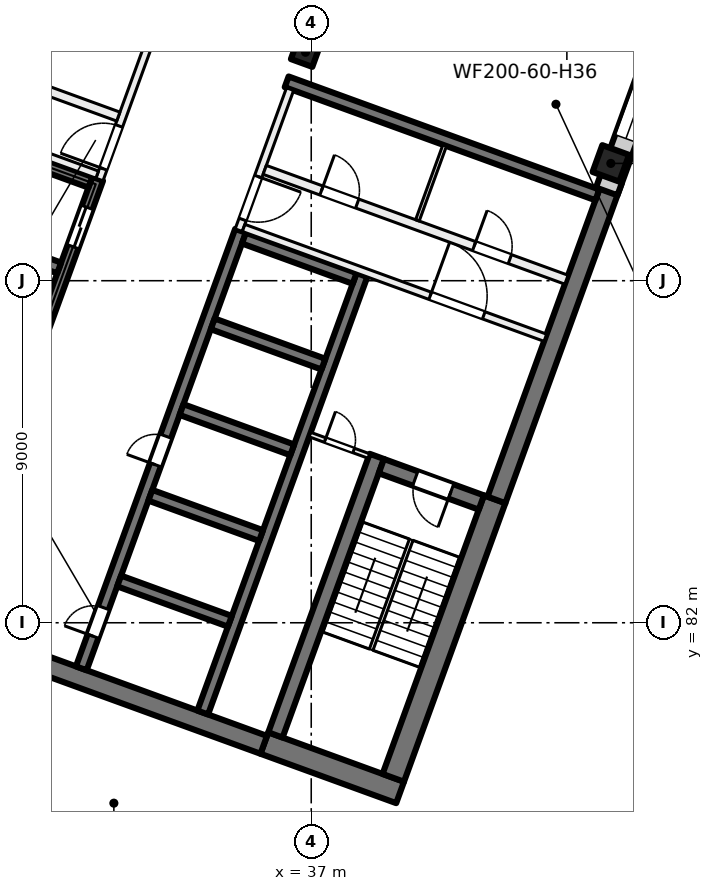
"""IFC4 building model, lengths in metres.
Left out: names, types, materials, properties, quantities, classifications, styles, units other than length and angle.
Written with IfcOpenShell. Run it as: python <this file> out.ifc"""

import sys

from ifc_helpers import new_model, si_unit, direction, frame, frame_2d, origin, origin_2d, place, context, subcontext, project, spatial, rectangle, extrude, element, fill, save


model = new_model("IFC4")
c1 = context("Model", 3, precision=1e-05, world=origin(), true_north=direction((0.0, 1.0)))
c2 = subcontext(c1, "Body", "Model", "MODEL_VIEW")
j1 = project(units=[si_unit("LENGTHUNIT", "METRE"), si_unit("PLANEANGLEUNIT", "RADIAN")], contexts=[c1])
p1 = place(None, origin())
s1 = spatial("IfcSite", under=j1, at=p1, CompositionType="ELEMENT")
p2 = place(p1, origin())
s2 = spatial("IfcBuilding", under=s1, at=p2, CompositionType="ELEMENT")
p3 = place(p2, frame((0.0, 0.0, 212.0)))
s3 = spatial("IfcBuildingStorey", under=s2, at=p3, CompositionType="ELEMENT", Elevation=212.0)
p4 = place(p3, frame((36.849, 97.011, 0.0), z_axis=(0.0, 0.0, 1.0), x_axis=(-0.342020143326, -0.939692620786, 0.0)))
e1 = element("IfcColumn", 1, at=p4, inside=s3, PredefinedType="COLUMN", context=c2, shape_type="SweptSolid", body=[
    extrude(rectangle(XDim=0.6, YDim=0.6, at=origin_2d()), origin(), (0.0, 0.0, 1.0), 4.0),
])
p5 = place(p3, frame((44.884, 94.087, 0.0), z_axis=(0.0, 0.0, 1.0), x_axis=(-0.342020143326, -0.939692620786, 0.0)))
e2 = element("IfcColumn", 2, at=p5, inside=s3, PredefinedType="COLUMN", context=c2, shape_type="SweptSolid", body=[
    extrude(rectangle(XDim=0.75, YDim=0.75, at=origin_2d()), origin(), (0.0, 0.0, 1.0), 4.0),
])
p6 = place(p3, frame((39.338, 77.535, 0.0), z_axis=(0.0, 0.0, 1.0), x_axis=(-0.939701471648, 0.341995824804, 0.0)))
e3 = element("IfcWall", 3, at=p6, inside=s3, PredefinedType="SHEAR", context=c2, shape_type="SweptSolid", body=[
    extrude(rectangle(XDim=3.8, YDim=0.6, at=frame_2d((1.9, 0.0))), origin(), (0.0, 0.0, 1.0), 4.0),
])
p7 = place(p3, frame((35.75, 78.788, 0.0), z_axis=(0.0, 0.0, 1.0), x_axis=(-0.939692894512, 0.342019391267, 0.0)))
e4 = element("IfcWall", 4, at=p7, inside=s3, PredefinedType="SHEAR", context=c2, shape_type="SweptSolid", body=[
    extrude(rectangle(XDim=14.4, YDim=0.5, at=frame_2d((7.2, 0.0))), origin(), (0.0, 0.0, 1.0), 4.0),
])
p8 = place(p3, frame((39.159, 77.92, 0.0), z_axis=(0.0, 0.0, 1.0), x_axis=(0.342016982193, 0.939693771338, 0.0)))
e5 = element("IfcWall", 5, at=p8, inside=s3, PredefinedType="SHEAR", context=c2, shape_type="SweptSolid", body=[
    extrude(rectangle(XDim=7.8, YDim=0.6, at=frame_2d((3.9, 0.0))), origin(), (0.0, 0.0, 1.0), 4.0),
])
p9 = place(p3, frame((41.874, 85.232, 0.0), z_axis=(0.0, 0.0, 1.0), x_axis=(0.342020437038, 0.939692513883, 0.0)))
e6 = element("IfcWall", 6, at=p9, inside=s3, PredefinedType="SHEAR", context=c2, shape_type="SweptSolid", body=[
    extrude(rectangle(XDim=8.975, YDim=0.5, at=frame_2d((4.487, 0.0))), origin(), (0.0, 0.0, 1.0), 4.0),
])
p10 = place(p3, frame((36.058, 79.048, 0.0), z_axis=(0.0, 0.0, 1.0), x_axis=(0.342016982193, 0.939693771338, 0.0)))
e7 = element("IfcWall", 7, at=p10, inside=s3, PredefinedType="SHEAR", context=c2, shape_type="SweptSolid", body=[
    extrude(rectangle(XDim=7.8, YDim=0.4, at=frame_2d((3.9, 0.0))), origin(), (0.0, 0.0, 1.0), 4.0),
])
p11 = place(p3, frame((41.476, 85.164, 0.0), z_axis=(0.0, 0.0, 1.0), x_axis=(-0.939678810556, 0.342058084236, 0.0)))
e8 = element("IfcWall", 8, at=p11, inside=s3, PredefinedType="SHEAR", context=c2, shape_type="SweptSolid", body=[
    extrude(rectangle(XDim=2.8, YDim=0.4, at=frame_2d((1.4, 0.0))), origin(), (0.0, 0.0, 1.0), 4.0),
])
p12 = place(p11, frame((0.85, 0.0, 0.0)))
e9 = element("IfcOpeningElement", 9, at=p12, cuts=e8, PredefinedType="OPENING", context=c2, shape_type="SweptSolid", body=[
    extrude(rectangle(XDim=1.0, YDim=2.1, at=frame_2d((0.5, 1.05))), frame((0.0, 0.21, 0.0), z_axis=(0.0, -1.0, 0.0), x_axis=(1.0, 0.0, 0.0)), (0.0, 0.0, 1.0), 0.42),
])
p13 = place(p3, frame((30.949, 80.801, 0.0), z_axis=(0.0, 0.0, 1.0), x_axis=(0.342016684409, 0.939693879721, 0.0)))
e10 = element("IfcWall", 10, at=p13, inside=s3, PredefinedType="SHEAR", context=c2, shape_type="SweptSolid", body=[
    extrude(rectangle(XDim=12.25, YDim=0.3, at=frame_2d((6.125, 0.0))), origin(), (0.0, 0.0, 1.0), 4.0),
])
p14 = place(p13, frame((0.9, 0.0, 0.0)))
e11 = element("IfcOpeningElement", 11, at=p14, cuts=e10, PredefinedType="OPENING", context=c2, shape_type="SweptSolid", body=[
    extrude(rectangle(XDim=0.8, YDim=2.1, at=frame_2d((0.4, 1.05))), frame((0.0, 0.16, 0.0), z_axis=(0.0, -1.0, 0.0), x_axis=(1.0, 0.0, 0.0)), (0.0, 0.0, 1.0), 0.32),
])
p15 = place(p13, frame((5.7, 0.0, 0.0)))
e12 = element("IfcOpeningElement", 12, at=p15, cuts=e10, PredefinedType="OPENING", context=c2, shape_type="SweptSolid", body=[
    extrude(rectangle(XDim=0.8, YDim=2.1, at=frame_2d((0.4, 1.05))), frame((0.0, 0.16, 0.0), z_axis=(0.0, -1.0, 0.0), x_axis=(1.0, 0.0, 0.0)), (0.0, 0.0, 1.0), 0.32),
])
p16 = place(p3, frame((34.144, 79.638, 0.0), z_axis=(0.0, 0.0, 1.0), x_axis=(0.342016684409, 0.939693879721, 0.0)))
e13 = element("IfcWall", 13, at=p16, inside=s3, PredefinedType="SHEAR", context=c2, shape_type="SweptSolid", body=[
    extrude(rectangle(XDim=12.25, YDim=0.3, at=frame_2d((6.125, 0.0))), origin(), (0.0, 0.0, 1.0), 4.0),
])
p17 = place(p3, frame((34.858, 82.039, 0.0), z_axis=(0.0, 0.0, 1.0), x_axis=(-0.939689908313, 0.342027595692, 0.0)))
e14 = element("IfcWall", 14, at=p17, inside=s3, PredefinedType="SHEAR", context=c2, shape_type="SweptSolid", body=[
    extrude(rectangle(XDim=3.1, YDim=0.3, at=frame_2d((1.55, 0.0))), origin(), (0.0, 0.0, 1.0), 4.0),
])
p18 = place(p3, frame((35.679, 84.294, 0.0), z_axis=(0.0, 0.0, 1.0), x_axis=(-0.939706007505, 0.341983361377, 0.0)))
e15 = element("IfcWall", 15, at=p18, inside=s3, PredefinedType="SHEAR", context=c2, shape_type="SweptSolid", body=[
    extrude(rectangle(XDim=3.1, YDim=0.3, at=frame_2d((1.55, 0.0))), origin(), (0.0, 0.0, 1.0), 4.0),
])
for number, where, z_axis, x_axis in (
    (16, (36.5, 86.549, 0.0), (0.0, 0.0, 1.0), (-0.94, 0.342, 0.0)),
    (17, (37.321, 88.805, 0.0), (0.0, 0.0, 1.0), (-0.94, 0.342, 0.0)),
    (18, (38.142, 91.06, 0.0), (0.0, 0.0, 1.0), (-0.94, 0.342, 0.0)),
):
    element("IfcWall", number, at=place(p3, frame(where, z_axis=z_axis, x_axis=x_axis)), inside=s3, PredefinedType="SHEAR", context=c2, shape_type="SweptSolid", body=[
        extrude(rectangle(XDim=3.1, YDim=0.3, at=frame_2d((1.55, 0.0))), origin(), (0.0, 0.0, 1.0), 4.0),
    ])
p19 = place(p3, frame((27.191, 82.169, 0.0), z_axis=(0.0, 0.0, 1.0), x_axis=(0.342016684409, 0.939693879721, 0.0)))
e19 = element("IfcWall", 19, at=p19, inside=s3, PredefinedType="SHEAR", context=c2, shape_type="SweptSolid", body=[
    extrude(rectangle(XDim=12.25, YDim=0.3, at=frame_2d((6.125, 0.0))), origin(), (0.0, 0.0, 1.0), 4.0),
])
p20 = place(p19, frame((0.75, 0.0, 0.0)))
e20 = element("IfcOpeningElement", 20, at=p20, cuts=e19, PredefinedType="OPENING", context=c2, shape_type="SweptSolid", body=[
    extrude(rectangle(XDim=1.1, YDim=2.1, at=frame_2d((0.55, 1.05))), frame((0.0, 0.16, 0.0), z_axis=(0.0, -1.0, 0.0), x_axis=(1.0, 0.0, 0.0)), (0.0, 0.0, 1.0), 0.32),
])
p21 = place(p19, frame((3.15, 0.0, 0.0)))
e21 = element("IfcOpeningElement", 21, at=p21, cuts=e19, PredefinedType="OPENING", context=c2, shape_type="SweptSolid", body=[
    extrude(rectangle(XDim=1.1, YDim=2.1, at=frame_2d((0.55, 1.05))), frame((0.0, 0.16, 0.0), z_axis=(0.0, -1.0, 0.0), x_axis=(1.0, 0.0, 0.0)), (0.0, 0.0, 1.0), 0.32),
])
p22 = place(p19, frame((5.55, 0.0, 0.0)))
e22 = element("IfcOpeningElement", 22, at=p22, cuts=e19, PredefinedType="OPENING", context=c2, shape_type="SweptSolid", body=[
    extrude(rectangle(XDim=1.1, YDim=2.1, at=frame_2d((0.55, 1.05))), frame((0.0, 0.16, 0.0), z_axis=(0.0, -1.0, 0.0), x_axis=(1.0, 0.0, 0.0)), (0.0, 0.0, 1.0), 0.32),
])
p23 = place(p19, frame((10.35, 0.0, 0.0)))
e23 = element("IfcOpeningElement", 23, at=p23, cuts=e19, PredefinedType="OPENING", context=c2, shape_type="SweptSolid", body=[
    extrude(rectangle(XDim=1.1, YDim=2.1, at=frame_2d((0.55, 1.05))), frame((0.0, 0.16, 0.0), z_axis=(0.0, -1.0, 0.0), x_axis=(1.0, 0.0, 0.0)), (0.0, 0.0, 1.0), 0.32),
])
for number, where, z_axis, x_axis in (
    (24, (30.367, 91.336, 0.0), (0.0, 0.0, 1.0), (-0.94, 0.342, 0.0)),
    (25, (31.188, 93.591, 0.0), (0.0, 0.0, 1.0), (-0.94, 0.342, 0.0)),
):
    element("IfcWall", number, at=place(p3, frame(where, z_axis=z_axis, x_axis=x_axis)), inside=s3, PredefinedType="SHEAR", context=c2, shape_type="SweptSolid", body=[
        extrude(rectangle(XDim=3.1, YDim=0.3, at=frame_2d((1.55, 0.0))), origin(), (0.0, 0.0, 1.0), 4.0),
    ])
p24 = place(p3, frame((44.529, 93.258, 0.0), z_axis=(0.0, 0.0, 1.0), x_axis=(-0.9396917844, 0.342022441267, 0.0)))
e26 = element("IfcWall", 26, at=p24, inside=s3, PredefinedType="SHEAR", context=c2, shape_type="SweptSolid", body=[
    extrude(rectangle(XDim=8.7, YDim=0.3, at=frame_2d((4.35, 0.0))), origin(), (0.0, 0.0, 1.0), 4.0),
])
p25 = place(p3, frame((51.877, 112.862, 0.0), z_axis=(0.0, 0.0, 1.0), x_axis=(-0.342020589714, -0.939692458314, 0.0)))
e27 = element("IfcWall", 27, at=p25, inside=s3, PredefinedType="SOLIDWALL", context=c2, shape_type="SweptSolid", body=[
    extrude(rectangle(XDim=20.765, YDim=0.6, at=frame_2d((10.382, 0.0))), origin(), (0.0, 0.0, 1.0), 3.625),
])
p26 = place(p25, frame((2.785, 0.0, 0.9)))
e28 = element("IfcOpeningElement", 28, at=p26, cuts=e27, PredefinedType="OPENING", context=c2, shape_type="SweptSolid", body=[
    extrude(rectangle(XDim=3.0, YDim=2.4, at=frame_2d((1.5, 1.2))), frame((0.0, 0.31, 0.0), z_axis=(0.0, -1.0, 0.0), x_axis=(1.0, 0.0, 0.0)), (0.0, 0.0, 1.0), 0.62),
])
p27 = place(p25, frame((7.285, 0.0, 0.9)))
e29 = element("IfcOpeningElement", 29, at=p27, cuts=e27, PredefinedType="OPENING", context=c2, shape_type="SweptSolid", body=[
    extrude(rectangle(XDim=3.0, YDim=2.4, at=frame_2d((1.5, 1.2))), frame((0.0, 0.31, 0.0), z_axis=(0.0, -1.0, 0.0), x_axis=(1.0, 0.0, 0.0)), (0.0, 0.0, 1.0), 0.62),
])
p28 = place(p25, frame((11.785, 0.0, 0.9)))
e30 = element("IfcOpeningElement", 30, at=p28, cuts=e27, PredefinedType="OPENING", context=c2, shape_type="SweptSolid", body=[
    extrude(rectangle(XDim=3.0, YDim=2.4, at=frame_2d((1.5, 1.2))), frame((0.0, 0.31, 0.0), z_axis=(0.0, -1.0, 0.0), x_axis=(1.0, 0.0, 0.0)), (0.0, 0.0, 1.0), 0.62),
])
p29 = place(p25, frame((16.285, 0.0, 0.9)))
e31 = element("IfcOpeningElement", 31, at=p29, cuts=e27, PredefinedType="OPENING", context=c2, shape_type="SweptSolid", body=[
    extrude(rectangle(XDim=3.0, YDim=2.4, at=frame_2d((1.5, 1.2))), frame((0.0, 0.31, 0.0), z_axis=(0.0, -1.0, 0.0), x_axis=(1.0, 0.0, 0.0)), (0.0, 0.0, 1.0), 0.62),
])
p30 = place(p3, frame((31.427, 93.663, 0.0), z_axis=(0.0, 0.0, 1.0), x_axis=(0.342030870568, 0.93968871632, 0.0)))
e32 = element("IfcWall", 32, at=p30, inside=s3, PredefinedType="PARTITIONING", context=c2, shape_type="SweptSolid", body=[
    extrude(rectangle(XDim=3.95, YDim=0.2, at=frame_2d((1.975, 0.0))), origin(), (0.0, 0.0, 1.0), 3.625),
])
p31 = place(p30, frame((0.3, 0.0, 0.0)))
e33 = element("IfcOpeningElement", 33, at=p31, cuts=e32, PredefinedType="OPENING", context=c2, shape_type="SweptSolid", body=[
    extrude(rectangle(XDim=1.2, YDim=2.1, at=frame_2d((0.6, 1.05))), frame((0.0, 0.11, 0.0), z_axis=(0.0, -1.0, 0.0), x_axis=(1.0, 0.0, 0.0)), (0.0, 0.0, 1.0), 0.22),
])
p32 = place(p3, frame((23.427, 96.682, 0.0), z_axis=(0.0, 0.0, 1.0), x_axis=(0.939690465531, -0.342026064782, 0.0)))
e34 = element("IfcWall", 34, at=p32, inside=s3, PredefinedType="PARTITIONING", context=c2, shape_type="SweptSolid", body=[
    extrude(rectangle(XDim=8.45, YDim=0.2, at=frame_2d((4.225, 0.0))), origin(), (0.0, 0.0, 1.0), 3.625),
])
p33 = place(p32, frame((1.725, 0.0, 0.0)))
e35 = element("IfcOpeningElement", 35, at=p33, cuts=e34, PredefinedType="OPENING", context=c2, shape_type="SweptSolid", body=[
    extrude(rectangle(XDim=1.5, YDim=2.1, at=frame_2d((0.75, 1.05))), frame((0.0, 0.11, 0.0), z_axis=(0.0, -1.0, 0.0), x_axis=(1.0, 0.0, 0.0)), (0.0, 0.0, 1.0), 0.22),
])
p34 = place(p3, frame((23.983, 98.208, 0.0), z_axis=(0.0, 0.0, 1.0), x_axis=(0.939699751196, -0.342000552051, 0.0)))
e36 = element("IfcWall", 36, at=p34, inside=s3, PredefinedType="PARTITIONING", context=c2, shape_type="SweptSolid", body=[
    extrude(rectangle(XDim=8.45, YDim=0.25, at=frame_2d((4.225, 0.0))), origin(), (0.0, 0.0, 1.0), 3.625),
])
p35 = place(p34, frame((3.825, 0.0, 0.0)))
e37 = element("IfcOpeningElement", 37, at=p35, cuts=e36, PredefinedType="OPENING", context=c2, shape_type="SweptSolid", body=[
    extrude(rectangle(XDim=0.8, YDim=2.1, at=frame_2d((0.4, 1.05))), frame((0.0, 0.135, 0.0), z_axis=(0.0, -1.0, 0.0), x_axis=(1.0, 0.0, 0.0)), (0.0, 0.0, 1.0), 0.27),
])
p36 = place(p3, frame((36.443, 96.041, 0.0), z_axis=(0.0, 0.0, 1.0), x_axis=(-0.341996156931, -0.939701350773, 0.0)))
e38 = element("IfcWall", 38, at=p36, inside=s3, PredefinedType="PARTITIONING", context=c2, shape_type="SweptSolid", body=[
    extrude(rectangle(XDim=3.95, YDim=0.2, at=frame_2d((1.975, 0.0))), origin(), (0.0, 0.0, 1.0), 3.625),
])
p37 = place(p36, frame((2.45, 0.0, 0.0)))
e39 = element("IfcOpeningElement", 39, at=p37, cuts=e38, PredefinedType="OPENING", context=c2, shape_type="SweptSolid", body=[
    extrude(rectangle(XDim=1.2, YDim=2.1, at=frame_2d((0.6, 1.05))), frame((0.0, 0.11, 0.0), z_axis=(0.0, -1.0, 0.0), x_axis=(1.0, 0.0, 0.0)), (0.0, 0.0, 1.0), 0.22),
])
p38 = place(p3, frame((35.22, 92.389, 0.0), z_axis=(0.0, 0.0, 1.0), x_axis=(0.939690465531, -0.342026064782, 0.0)))
e40 = element("IfcWall", 40, at=p38, inside=s3, PredefinedType="PARTITIONING", context=c2, shape_type="SweptSolid", body=[
    extrude(rectangle(XDim=8.45, YDim=0.2, at=frame_2d((4.225, 0.0))), origin(), (0.0, 0.0, 1.0), 3.625),
])
p39 = place(p38, frame((5.225, 0.0, 0.0)))
e41 = element("IfcOpeningElement", 41, at=p39, cuts=e40, PredefinedType="OPENING", context=c2, shape_type="SweptSolid", body=[
    extrude(rectangle(XDim=1.5, YDim=2.1, at=frame_2d((0.75, 1.05))), frame((0.0, 0.11, 0.0), z_axis=(0.0, -1.0, 0.0), x_axis=(1.0, 0.0, 0.0)), (0.0, 0.0, 1.0), 0.22),
])
p40 = place(p3, frame((35.776, 93.916, 0.0), z_axis=(0.0, 0.0, 1.0), x_axis=(0.939690465531, -0.342026064782, 0.0)))
e42 = element("IfcWall", 42, at=p40, inside=s3, PredefinedType="PARTITIONING", context=c2, shape_type="SweptSolid", body=[
    extrude(rectangle(XDim=8.45, YDim=0.25, at=frame_2d((4.225, 0.0))), origin(), (0.0, 0.0, 1.0), 3.625),
])
p41 = place(p40, frame((1.59, 0.0, 0.0)))
e43 = element("IfcOpeningElement", 43, at=p41, cuts=e42, PredefinedType="OPENING", context=c2, shape_type="SweptSolid", body=[
    extrude(rectangle(XDim=1.0, YDim=2.1, at=frame_2d((0.5, 1.05))), frame((0.0, 0.135, 0.0), z_axis=(0.0, -1.0, 0.0), x_axis=(1.0, 0.0, 0.0)), (0.0, 0.0, 1.0), 0.27),
])
p42 = place(p40, frame((5.865, 0.0, 0.0)))
e44 = element("IfcOpeningElement", 44, at=p42, cuts=e42, PredefinedType="OPENING", context=c2, shape_type="SweptSolid", body=[
    extrude(rectangle(XDim=1.0, YDim=2.1, at=frame_2d((0.5, 1.05))), frame((0.0, 0.135, 0.0), z_axis=(0.0, -1.0, 0.0), x_axis=(1.0, 0.0, 0.0)), (0.0, 0.0, 1.0), 0.27),
])
p43 = place(p3, frame((36.966, 86.952, 0.0), z_axis=(0.0, 0.0, 1.0), x_axis=(0.939672407396, -0.342075674051, 0.0)))
e45 = element("IfcWall", 45, at=p43, inside=s3, PredefinedType="PARTITIONING", context=c2, shape_type="SweptSolid", body=[
    extrude(rectangle(XDim=1.65, YDim=0.125, at=frame_2d((0.825, 0.0))), origin(), (0.0, 0.0, 1.0), 3.625),
])
p44 = place(p43, frame((0.425, 0.0, 0.0)))
e46 = element("IfcOpeningElement", 46, at=p44, cuts=e45, PredefinedType="OPENING", context=c2, shape_type="SweptSolid", body=[
    extrude(rectangle(XDim=0.8, YDim=2.1, at=frame_2d((0.4, 1.05))), frame((0.0, 0.073, 0.0), z_axis=(0.0, -1.0, 0.0), x_axis=(1.0, 0.0, 0.0)), (0.0, 0.0, 1.0), 0.145),
])
p45 = place(p3, frame((40.512, 94.56, 0.0), z_axis=(0.0, 0.0, 1.0), x_axis=(-0.342023078919, -0.939691552312, 0.0)))
e47 = element("IfcWall", 47, at=p45, inside=s3, PredefinedType="PARTITIONING", context=c2, shape_type="SweptSolid", body=[
    extrude(rectangle(XDim=2.1, YDim=0.1, at=frame_2d((1.05, 0.0))), origin(), (0.0, 0.0, 1.0), 3.625),
])
p46 = place(p29, origin())
e48 = element("IfcWindow", 48, at=p46, inside=s3, PartitioningType="SINGLE_PANEL", PredefinedType="WINDOW", context=c2, shape_type="SweptSolid", body=[
    extrude(rectangle(XDim=3.0, YDim=2.4, at=frame_2d((1.5, 1.2))), frame((0.0, 0.03, 0.0), z_axis=(0.0, -1.0, 0.0), x_axis=(1.0, 0.0, 0.0)), (0.0, 0.0, 1.0), 0.06),
])
fill(e31, e48)
p47 = place(p23, origin())
e49 = element("IfcDoor", 49, at=p47, inside=s3, OperationType="DOUBLE_DOOR_SLIDING", PredefinedType="DOOR", context=c2, shape_type="SweptSolid", body=[
    extrude(rectangle(XDim=1.1, YDim=2.1, at=frame_2d((0.55, 1.05))), frame((0.0, 0.025, 0.0), z_axis=(0.0, -1.0, 0.0), x_axis=(1.0, 0.0, 0.0)), (0.0, 0.0, 1.0), 0.05),
])
fill(e23, e49)
p48 = place(p14, origin())
e50 = element("IfcDoor", 50, at=p48, inside=s3, OperationType="SINGLE_SWING_LEFT", PredefinedType="DOOR", context=c2, shape_type="SweptSolid", body=[
    extrude(rectangle(XDim=0.8, YDim=2.1, at=frame_2d((0.4, 1.05))), frame((0.0, 0.025, 0.0), z_axis=(0.0, -1.0, 0.0), x_axis=(1.0, 0.0, 0.0)), (0.0, 0.0, 1.0), 0.05),
])
fill(e11, e50)
p49 = place(p15, origin())
e51 = element("IfcDoor", 51, at=p49, inside=s3, OperationType="SINGLE_SWING_RIGHT", PredefinedType="DOOR", context=c2, shape_type="SweptSolid", body=[
    extrude(rectangle(XDim=0.8, YDim=2.1, at=frame_2d((0.4, 1.05))), frame((0.0, 0.025, 0.0), z_axis=(0.0, -1.0, 0.0), x_axis=(1.0, 0.0, 0.0)), (0.0, 0.0, 1.0), 0.05),
])
fill(e12, e51)
p50 = place(p31, origin())
e52 = element("IfcDoor", 52, at=p50, inside=s3, OperationType="DOUBLE_DOOR_SINGLE_SWING", PredefinedType="DOOR", context=c2, shape_type="SweptSolid", body=[
    extrude(rectangle(XDim=1.2, YDim=2.1, at=frame_2d((0.6, 1.05))), frame((0.0, 0.025, 0.0), z_axis=(0.0, -1.0, 0.0), x_axis=(1.0, 0.0, 0.0)), (0.0, 0.0, 1.0), 0.05),
])
fill(e33, e52)
p51 = place(p37, origin())
e53 = element("IfcDoor", 53, at=p51, inside=s3, OperationType="DOUBLE_DOOR_SINGLE_SWING", PredefinedType="DOOR", context=c2, shape_type="SweptSolid", body=[
    extrude(rectangle(XDim=1.2, YDim=2.1, at=frame_2d((0.6, 1.05))), frame((0.0, 0.025, 0.0), z_axis=(0.0, -1.0, 0.0), x_axis=(1.0, 0.0, 0.0)), (0.0, 0.0, 1.0), 0.05),
])
fill(e39, e53)
p52 = place(p39, origin())
e54 = element("IfcDoor", 54, at=p52, inside=s3, OperationType="DOUBLE_DOOR_SINGLE_SWING", PredefinedType="DOOR", context=c2, shape_type="SweptSolid", body=[
    extrude(rectangle(XDim=1.5, YDim=2.1, at=frame_2d((0.75, 1.05))), frame((0.0, 0.025, 0.0), z_axis=(0.0, -1.0, 0.0), x_axis=(1.0, 0.0, 0.0)), (0.0, 0.0, 1.0), 0.05),
])
fill(e41, e54)
p53 = place(p12, origin())
e55 = element("IfcDoor", 55, at=p53, inside=s3, OperationType="SINGLE_SWING_RIGHT", PredefinedType="DOOR", context=c2, shape_type="SweptSolid", body=[
    extrude(rectangle(XDim=1.0, YDim=2.1, at=frame_2d((0.5, 1.05))), frame((0.0, 0.025, 0.0), z_axis=(0.0, -1.0, 0.0), x_axis=(1.0, 0.0, 0.0)), (0.0, 0.0, 1.0), 0.05),
])
fill(e9, e55)
p54 = place(p44, origin())
e56 = element("IfcDoor", 56, at=p54, inside=s3, OperationType="SINGLE_SWING_LEFT", PredefinedType="DOOR", context=c2, shape_type="SweptSolid", body=[
    extrude(rectangle(XDim=0.8, YDim=2.1, at=frame_2d((0.4, 1.05))), frame((0.0, 0.025, 0.0), z_axis=(0.0, -1.0, 0.0), x_axis=(1.0, 0.0, 0.0)), (0.0, 0.0, 1.0), 0.05),
])
fill(e46, e56)
p55 = place(p41, origin())
e57 = element("IfcDoor", 57, at=p55, inside=s3, OperationType="SINGLE_SWING_RIGHT", PredefinedType="DOOR", context=c2, shape_type="SweptSolid", body=[
    extrude(rectangle(XDim=1.0, YDim=2.1, at=frame_2d((0.5, 1.05))), frame((0.0, 0.025, 0.0), z_axis=(0.0, -1.0, 0.0), x_axis=(1.0, 0.0, 0.0)), (0.0, 0.0, 1.0), 0.05),
])
fill(e43, e57)
p56 = place(p42, origin())
e58 = element("IfcDoor", 58, at=p56, inside=s3, OperationType="SINGLE_SWING_LEFT", PredefinedType="DOOR", context=c2, shape_type="SweptSolid", body=[
    extrude(rectangle(XDim=1.0, YDim=2.1, at=frame_2d((0.5, 1.05))), frame((0.0, 0.025, 0.0), z_axis=(0.0, -1.0, 0.0), x_axis=(1.0, 0.0, 0.0)), (0.0, 0.0, 1.0), 0.05),
])
fill(e44, e58)
save(model, sys.argv[1])
